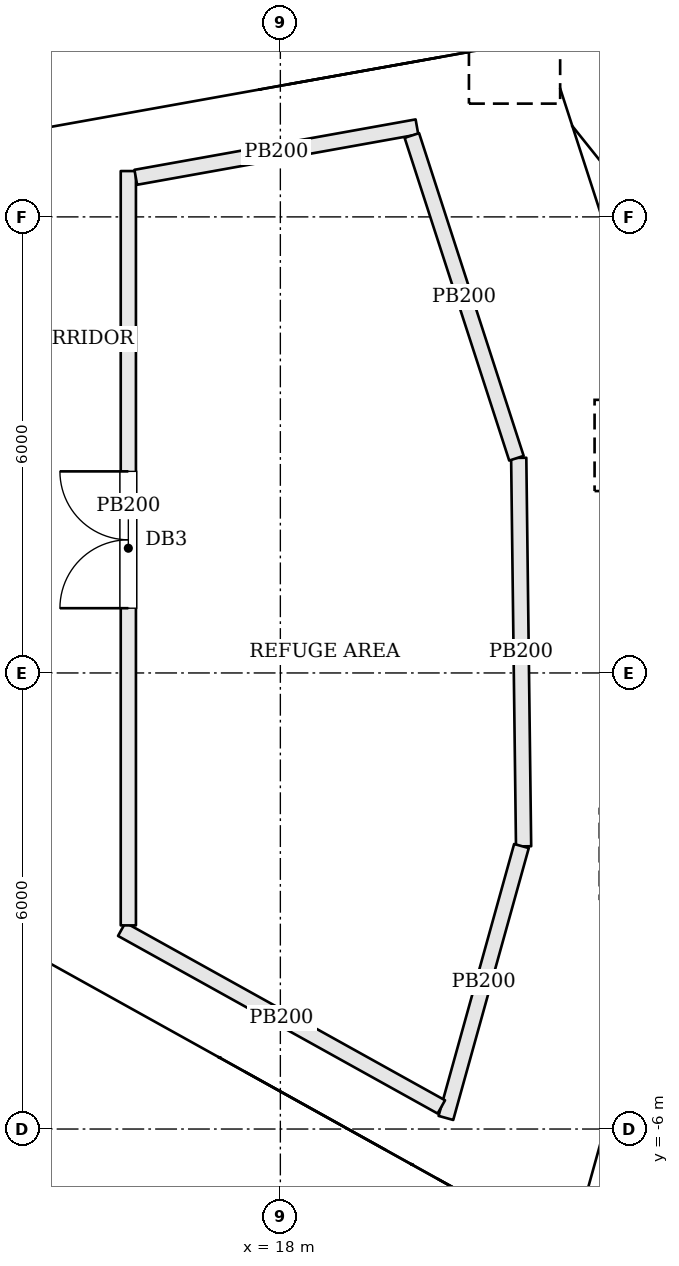
"""IFC4 building model, lengths in metres.
Left out: names, types, materials, properties, quantities, classifications, styles, units other than length and angle.
Written with IfcOpenShell. Run it as: python <this file> out.ifc"""

import sys

from ifc_helpers import new_model, si_unit, direction, frame, frame_2d, origin, origin_2d, place, context, subcontext, project, spatial, rectangle, extrude, element, fill, save


model = new_model("IFC4")
c1 = context("Model", 3, precision=1e-05, world=origin(), true_north=direction((0.0, 1.0)))
c2 = subcontext(c1, "Body", "Model", "MODEL_VIEW")
j1 = project(units=[si_unit("LENGTHUNIT", "METRE"), si_unit("PLANEANGLEUNIT", "RADIAN")], contexts=[c1])
p1 = place(None, origin())
s1 = spatial("IfcSite", under=j1, at=p1, CompositionType="ELEMENT")
p2 = place(p1, origin())
s2 = spatial("IfcBuilding", under=s1, at=p2, CompositionType="ELEMENT")
p3 = place(p2, frame((0.0, 0.0, 121.2)))
s3 = spatial("IfcBuildingStorey", under=s2, at=p3, CompositionType="ELEMENT", Elevation=121.2)
p4 = place(p3, frame((24.669, 3.248, -0.536), z_axis=(-0.428524757066, -0.056498658987, 0.90176185), x_axis=(0.130713362485, -0.991420201967, 0.0)))
e1 = element("IfcColumn", 1, at=p4, inside=s3, PredefinedType="COLUMN", context=c2, shape_type="SweptSolid", body=[
    extrude(rectangle(XDim=1.2, YDim=1.2, at=origin_2d()), origin(), (0.0, 0.0, 1.0), 4.516),
])
p5 = place(p3, frame((22.879, 8.787, -0.538), z_axis=(-0.398723010129, -0.154583676523, 0.903949029617), x_axis=(0.361480683506, -0.932379598367, 0.0)))
e2 = element("IfcColumn", 2, at=p5, inside=s3, PredefinedType="COLUMN", context=c2, shape_type="SweptSolid", body=[
    extrude(rectangle(XDim=1.2, YDim=1.2, at=origin_2d()), origin(), (0.0, 0.0, 1.0), 4.509),
])
p6 = place(p3, frame((24.386, 7.874, 0.0), z_axis=(0.0, 0.0, 1.0), x_axis=(-0.502055516261, 0.864835393929, 0.0)))
e3 = element("IfcWall", 3, at=p6, inside=s3, PredefinedType="SOLIDWALL", context=c2, shape_type="SweptSolid", body=[
    extrude(rectangle(XDim=4.049, YDim=0.45, at=frame_2d((2.025, 0.0))), origin(), (0.0, 0.0, 1.0), 4.3),
])
p7 = place(p6, frame((0.975, 0.0, 1.2)))
e4 = element("IfcOpeningElement", 4, at=p7, cuts=e3, PredefinedType="OPENING", context=c2, shape_type="SweptSolid", body=[
    extrude(rectangle(XDim=2.1, YDim=1.8, at=frame_2d((1.05, 0.9))), frame((0.0, 0.235, 0.0), z_axis=(0.0, -1.0, 0.0), x_axis=(1.0, 0.0, 0.0)), (0.0, 0.0, 1.0), 0.47),
])
p8 = place(p3, frame((21.136, 2.83, 0.0), z_axis=(0.0, 0.0, 1.0), x_axis=(0.012513947205, -0.999921697497, 0.0)))
e5 = element("IfcWall", 5, at=p8, inside=s3, PredefinedType="PARTITIONING", context=c2, shape_type="SweptSolid", body=[
    extrude(rectangle(XDim=5.112, YDim=0.2, at=frame_2d((2.556, 0.0))), origin(), (0.0, 0.0, 1.0), 4.3),
])
p9 = place(p3, frame((21.172, -2.277, 0.0), z_axis=(0.0, 0.0, 1.0), x_axis=(-0.267782922221, -0.963479271478, 0.0)))
e6 = element("IfcWall", 6, at=p9, inside=s3, PredefinedType="PARTITIONING", context=c2, shape_type="SweptSolid", body=[
    extrude(rectangle(XDim=3.712, YDim=0.2, at=frame_2d((1.856, 0.0))), origin(), (0.0, 0.0, 1.0), 4.3),
])
p10 = place(p3, frame((20.118, -5.709, 0.0), z_axis=(0.0, 0.0, 1.0), x_axis=(-0.874078265919, 0.4857851223, 0.0)))
e7 = element("IfcWall", 7, at=p10, inside=s3, PredefinedType="PARTITIONING", context=c2, shape_type="SweptSolid", body=[
    extrude(rectangle(XDim=4.811, YDim=0.2, at=frame_2d((2.405, 0.0))), origin(), (0.0, 0.0, 1.0), 4.3),
])
p11 = place(p3, frame((16.0, -3.321, 0.0), z_axis=(0.0, 0.0, 1.0), x_axis=(0.0, 1.0, 0.0)))
e8 = element("IfcWall", 8, at=p11, inside=s3, PredefinedType="PARTITIONING", context=c2, shape_type="SweptSolid", body=[
    extrude(rectangle(XDim=9.924, YDim=0.2, at=frame_2d((4.962, 0.0))), origin(), (0.0, 0.0, 1.0), 4.3),
])
p12 = place(p11, frame((4.173, 0.0, 0.0)))
e9 = element("IfcOpeningElement", 9, at=p12, cuts=e8, PredefinedType="OPENING", context=c2, shape_type="SweptSolid", body=[
    extrude(rectangle(XDim=1.8, YDim=2.1, at=frame_2d((0.9, 1.05))), frame((0.0, 0.11, 0.0), z_axis=(0.0, -1.0, 0.0), x_axis=(1.0, 0.0, 0.0)), (0.0, 0.0, 1.0), 0.22),
])
p13 = place(p3, frame((16.098, 6.521, 0.0), z_axis=(0.0, 0.0, 1.0), x_axis=(0.984311730904, 0.176438137615, 0.0)))
e10 = element("IfcWall", 10, at=p13, inside=s3, PredefinedType="PARTITIONING", context=c2, shape_type="SweptSolid", body=[
    extrude(rectangle(XDim=3.758, YDim=0.2, at=frame_2d((1.879, 0.0))), origin(), (0.0, 0.0, 1.0), 4.3),
])
p14 = place(p3, frame((19.73, 7.071, 0.0), z_axis=(0.0, 0.0, 1.0), x_axis=(0.308274620054, -0.951297408086, 0.0)))
e11 = element("IfcWall", 11, at=p14, inside=s3, PredefinedType="PARTITIONING", context=c2, shape_type="SweptSolid", body=[
    extrude(rectangle(XDim=4.463, YDim=0.2, at=frame_2d((2.232, 0.0))), origin(), (0.0, 0.0, 1.0), 4.3),
])
p15 = place(p12, origin())
e12 = element("IfcDoor", 12, at=p15, inside=s3, OperationType="DOUBLE_DOOR_SINGLE_SWING", PredefinedType="DOOR", context=c2, shape_type="SweptSolid", body=[
    extrude(rectangle(XDim=1.8, YDim=2.1, at=frame_2d((0.9, 1.05))), frame((0.0, 0.025, 0.0), z_axis=(0.0, -1.0, 0.0), x_axis=(1.0, 0.0, 0.0)), (0.0, 0.0, 1.0), 0.05),
])
fill(e9, e12)
save(model, sys.argv[1])
